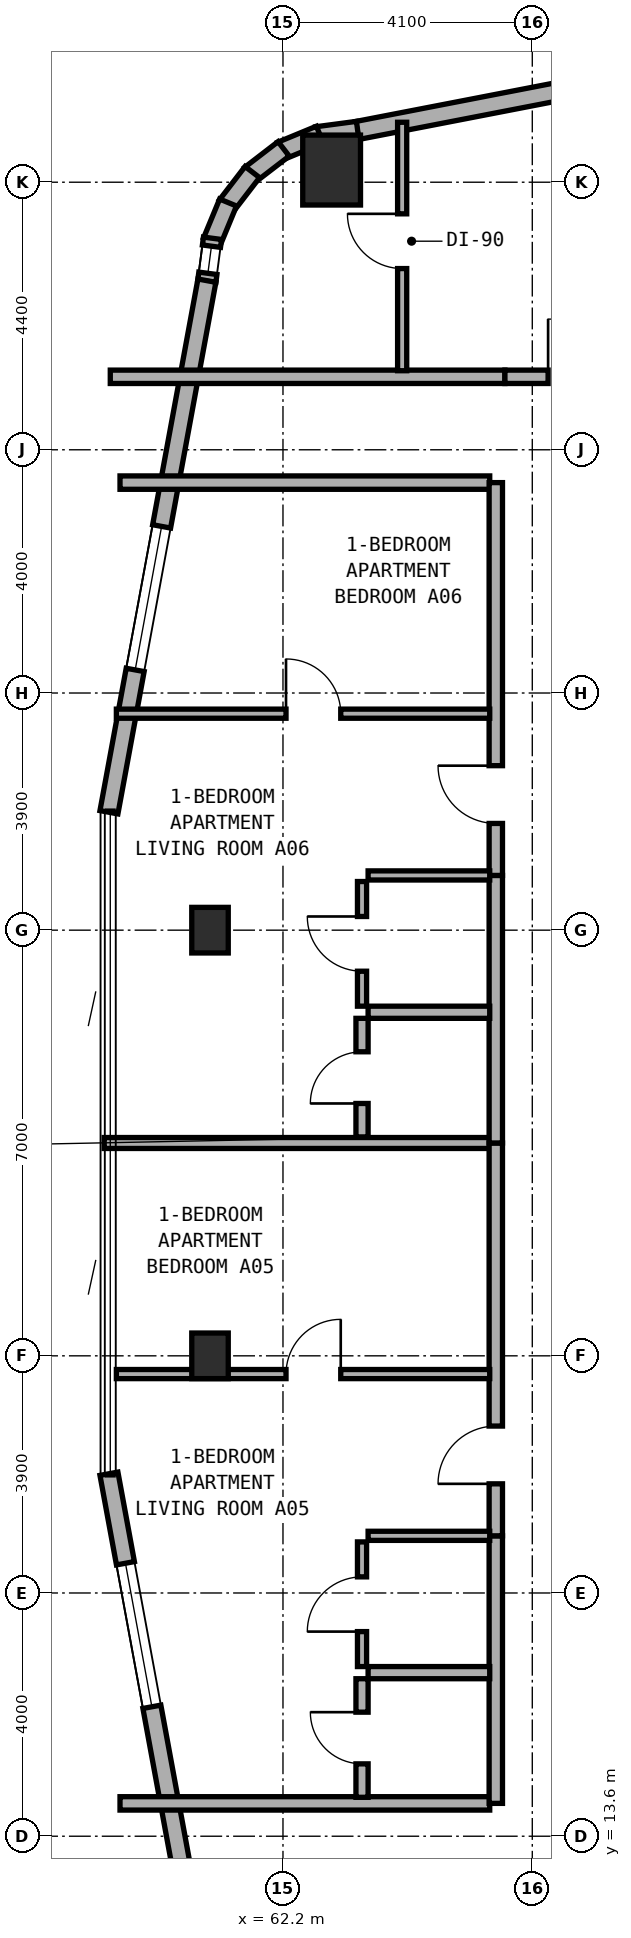
"""IFC4 building model, lengths in metres.
Left out: names, types, materials, properties, quantities, classifications, styles, units other than length and angle.
Written with IfcOpenShell. Run it as: python <this file> out.ifc"""

import sys

from ifc_helpers import new_model, si_unit, direction, frame, frame_2d, origin, origin_2d, place, context, subcontext, project, spatial, rectangle, extrude, element, fill, save


model = new_model("IFC4")
c1 = context("Model", 3, precision=1e-05, world=origin(), true_north=direction((0.0, 1.0)))
c2 = subcontext(c1, "Body", "Model", "MODEL_VIEW")
j1 = project(units=[si_unit("LENGTHUNIT", "METRE"), si_unit("PLANEANGLEUNIT", "RADIAN")], contexts=[c1])
p1 = place(None, origin())
s1 = spatial("IfcSite", under=j1, at=p1, CompositionType="ELEMENT")
p2 = place(p1, origin())
s2 = spatial("IfcBuilding", under=s1, at=p2, CompositionType="ELEMENT")
p3 = place(p2, frame((0.0, 0.0, 83.5)))
s3 = spatial("IfcBuildingStorey", under=s2, at=p3, CompositionType="ELEMENT", Elevation=83.5)
for number, where, z_axis, x_axis in (
    (1, (61.0, 21.5, 0.0), (0.0, 0.0, 1.0), (1.0, 0.0, 0.0)),
    (2, (61.0, 28.5, 0.0), (0.0, 0.0, 1.0), (1.0, 0.0, 0.0)),
):
    element("IfcColumn", number, at=place(p3, frame(where, z_axis=z_axis, x_axis=x_axis)), inside=s3, PredefinedType="COLUMN", context=c2, shape_type="SweptSolid", body=[
        extrude(rectangle(XDim=0.6, YDim=0.75, at=origin_2d()), origin(), (0.0, 0.0, 1.0), 3.5),
    ])
p4 = place(p3, frame((63.0, 41.0, 0.0), z_axis=(0.0, 0.0, 1.0), x_axis=(1.0, 0.0, 0.0)))
e3 = element("IfcColumn", 3, at=p4, inside=s3, PredefinedType="COLUMN", context=c2, shape_type="SweptSolid", body=[
    extrude(rectangle(XDim=0.95, YDim=1.15, at=origin_2d()), origin(), (0.0, 0.0, 1.0), 3.5),
])
p5 = place(p3, frame((71.743, 43.263, 0.0), z_axis=(0.0, 0.0, 1.0), x_axis=(-0.981750199588, -0.190175039396, 0.0)))
e4 = element("IfcWall", 4, at=p5, inside=s3, PredefinedType="STANDARD", context=c2, shape_type="SweptSolid", body=[
    extrude(rectangle(XDim=8.477, YDim=0.3, at=frame_2d((4.238, 0.0))), origin(), (0.0, 0.0, 1.0), 3.25),
])
p6 = place(p5, frame((2.623, 0.0, 0.8)))
e5 = element("IfcOpeningElement", 5, at=p6, cuts=e4, PredefinedType="OPENING", context=c2, shape_type="SweptSolid", body=[
    extrude(rectangle(XDim=2.4, YDim=1.6, at=frame_2d((1.2, 0.8))), frame((0.0, 0.16, 0.0), z_axis=(0.0, -1.0, 0.0), x_axis=(1.0, 0.0, 0.0)), (0.0, 0.0, 1.0), 0.32),
])
p7 = place(p3, frame((63.428, 41.652, 0.0), z_axis=(0.0, 0.0, 1.0), x_axis=(-0.991293937098, -0.131667498923, 0.0)))
e6 = element("IfcWall", 6, at=p7, inside=s3, PredefinedType="STANDARD", context=c2, shape_type="SweptSolid", body=[
    extrude(rectangle(XDim=0.677, YDim=0.3, at=frame_2d((0.338, 0.0))), origin(), (0.0, 0.0, 1.0), 3.25),
])
p8 = place(p3, frame((62.807, 41.582, 0.0), z_axis=(0.0, 0.0, 1.0), x_axis=(-0.924042561464, -0.382289608286, 0.0)))
e7 = element("IfcWall", 7, at=p8, inside=s3, PredefinedType="STANDARD", context=c2, shape_type="SweptSolid", body=[
    extrude(rectangle(XDim=0.694, YDim=0.3, at=frame_2d((0.347, 0.0))), origin(), (0.0, 0.0, 1.0), 3.25),
])
for number, where, z_axis, x_axis in (
    (8, (62.211, 41.348, 0.0), (0.0, 0.0, 1.0), (-0.793, -0.609, 0.0)),
    (9, (61.696, 40.967, 0.0), (0.0, 0.0, 1.0), (-0.61, -0.793, 0.0)),
    (10, (61.297, 40.466, 0.0), (0.0, 0.0, 1.0), (-0.382, -0.924, 0.0)),
):
    element("IfcWall", number, at=place(p3, frame(where, z_axis=z_axis, x_axis=x_axis)), inside=s3, PredefinedType="STANDARD", context=c2, shape_type="SweptSolid", body=[
        extrude(rectangle(XDim=0.694, YDim=0.3, at=frame_2d((0.347, 0.0))), origin(), (0.0, 0.0, 1.0), 3.25),
    ])
p9 = place(p3, frame((61.041, 39.878, 0.0), z_axis=(0.0, 0.0, 1.0), x_axis=(-0.130658543777, -0.991427427974, 0.0)))
e11 = element("IfcWall", 11, at=p9, inside=s3, PredefinedType="STANDARD", context=c2, shape_type="SweptSolid", body=[
    extrude(rectangle(XDim=0.712, YDim=0.3, at=frame_2d((0.356, 0.0))), origin(), (0.0, 0.0, 1.0), 3.25),
])
p10 = place(p9, frame((0.131, 0.0, 0.85)))
e12 = element("IfcOpeningElement", 12, at=p10, cuts=e11, PredefinedType="OPENING", context=c2, shape_type="SweptSolid", body=[
    extrude(rectangle(XDim=0.45, YDim=1.5, at=frame_2d((0.225, 0.75))), frame((0.0, 0.16, 0.0), z_axis=(0.0, -1.0, 0.0), x_axis=(1.0, 0.0, 0.0)), (0.0, 0.0, 1.0), 0.32),
])
p11 = place(p3, frame((60.949, 39.181, 0.0), z_axis=(0.0, 0.0, 1.0), x_axis=(-0.181241420611, -0.983438634311, 0.0)))
e13 = element("IfcWall", 13, at=p11, inside=s3, PredefinedType="STANDARD", context=c2, shape_type="SweptSolid", body=[
    extrude(rectangle(XDim=8.889, YDim=0.3, at=frame_2d((4.445, 0.0))), origin(), (0.0, 0.0, 1.0), 3.25),
])
p12 = place(p11, frame((4.109, 0.0, 0.8)))
e14 = element("IfcOpeningElement", 14, at=p12, cuts=e13, PredefinedType="OPENING", context=c2, shape_type="SweptSolid", body=[
    extrude(rectangle(XDim=2.4, YDim=1.6, at=frame_2d((1.2, 0.8))), frame((0.0, 0.16, 0.0), z_axis=(0.0, -1.0, 0.0), x_axis=(1.0, 0.0, 0.0)), (0.0, 0.0, 1.0), 0.32),
])
p13 = place(p3, frame((59.338, 19.561, 0.0), z_axis=(0.0, 0.0, 1.0), x_axis=(0.181241420611, -0.983438634311, 0.0)))
e15 = element("IfcWall", 15, at=p13, inside=s3, PredefinedType="STANDARD", context=c2, shape_type="SweptSolid", body=[
    extrude(rectangle(XDim=8.889, YDim=0.3, at=frame_2d((4.445, 0.0))), origin(), (0.0, 0.0, 1.0), 3.25),
])
p14 = place(p13, frame((1.497, 0.0, 0.8)))
e16 = element("IfcOpeningElement", 16, at=p14, cuts=e15, PredefinedType="OPENING", context=c2, shape_type="SweptSolid", body=[
    extrude(rectangle(XDim=2.4, YDim=1.6, at=frame_2d((1.2, 0.8))), frame((0.0, 0.16, 0.0), z_axis=(0.0, -1.0, 0.0), x_axis=(1.0, 0.0, 0.0)), (0.0, 0.0, 1.0), 0.32),
])
p15 = place(p3, frame((59.36, 37.6, 0.0), z_axis=(0.0, 0.0, 1.0), x_axis=(1.0, 0.0, 0.0)))
e17 = element("IfcWall", 17, at=p15, inside=s3, PredefinedType="SOLIDWALL", context=c2, shape_type="SweptSolid", body=[
    extrude(rectangle(XDim=6.49, YDim=0.22, at=frame_2d((3.245, 0.0))), origin(), (0.0, 0.0, 1.0), 2.945),
])
p16 = place(p3, frame((65.85, 37.6, 0.0), z_axis=(0.0, 0.0, 1.0), x_axis=(1.0, 0.0, 0.0)))
e18 = element("IfcWall", 18, at=p16, inside=s3, PredefinedType="SOLIDWALL", context=c2, shape_type="SweptSolid", body=[
    extrude(rectangle(XDim=2.37, YDim=0.22, at=frame_2d((1.185, 0.0))), origin(), (0.0, 0.0, 1.0), 3.22),
])
p17 = place(p16, frame((0.71, 0.0, 0.0)))
e19 = element("IfcOpeningElement", 19, at=p17, cuts=e18, PredefinedType="OPENING", context=c2, shape_type="SweptSolid", body=[
    extrude(rectangle(XDim=0.95, YDim=2.1, at=frame_2d((0.475, 1.05))), frame((0.0, 0.12, 0.0), z_axis=(0.0, -1.0, 0.0), x_axis=(1.0, 0.0, 0.0)), (0.0, 0.0, 1.0), 0.24),
])
p18 = place(p3, frame((64.16, 37.7, 0.0), z_axis=(0.0, 0.0, 1.0), x_axis=(0.0, 1.0, 0.0)))
e20 = element("IfcWall", 20, at=p18, inside=s3, PredefinedType="PARTITIONING", context=c2, shape_type="SweptSolid", body=[
    extrude(rectangle(XDim=4.086, YDim=0.15, at=frame_2d((2.043, 0.0))), origin(), (0.0, 0.0, 1.0), 2.945),
])
p19 = place(p18, frame((1.68, 0.0, 0.0)))
e21 = element("IfcOpeningElement", 21, at=p19, cuts=e20, PredefinedType="OPENING", context=c2, shape_type="SweptSolid", body=[
    extrude(rectangle(XDim=0.9, YDim=2.1, at=frame_2d((0.45, 1.05))), frame((0.0, 0.085, 0.0), z_axis=(0.0, -1.0, 0.0), x_axis=(1.0, 0.0, 0.0)), (0.0, 0.0, 1.0), 0.17),
])
for number, where, z_axis, x_axis in (
    (22, (59.52, 14.14, 0.0), (0.0, 0.0, 1.0), (1.0, 0.0, 0.0)),
    (23, (59.52, 35.86, 0.0), (0.0, 0.0, 1.0), (1.0, 0.0, 0.0)),
):
    element("IfcWall", number, at=place(p3, frame(where, z_axis=z_axis, x_axis=x_axis)), inside=s3, PredefinedType="SOLIDWALL", context=c2, shape_type="SweptSolid", body=[
        extrude(rectangle(XDim=6.08, YDim=0.22, at=frame_2d((3.04, 0.0))), origin(), (0.0, 0.0, 1.0), 2.945),
    ])
p20 = place(p3, frame((59.26, 25.0, 0.0), z_axis=(0.0, 0.0, 1.0), x_axis=(1.0, 0.0, 0.0)))
e24 = element("IfcWall", 24, at=p20, inside=s3, PredefinedType="SOLIDWALL", context=c2, shape_type="SweptSolid", body=[
    extrude(rectangle(XDim=6.44, YDim=0.18, at=frame_2d((3.22, 0.0))), origin(), (0.0, 0.0, 1.0), 2.945),
])
p21 = place(p3, frame((65.7, 14.14, 0.0), z_axis=(0.0, 0.0, 1.0), x_axis=(0.0, 1.0, 0.0)))
e25 = element("IfcWall", 25, at=p21, inside=s3, PredefinedType="SOLIDWALL", context=c2, shape_type="SweptSolid", body=[
    extrude(rectangle(XDim=4.4, YDim=0.22, at=frame_2d((2.2, 0.0))), origin(), (0.0, 0.0, 1.0), 3.22),
])
p22 = place(p3, frame((65.7, 18.54, 0.0), z_axis=(0.0, 0.0, 1.0), x_axis=(0.0, 1.0, 0.0)))
e26 = element("IfcWall", 26, at=p22, inside=s3, PredefinedType="SOLIDWALL", context=c2, shape_type="SweptSolid", body=[
    extrude(rectangle(XDim=6.46, YDim=0.22, at=frame_2d((3.23, 0.0))), origin(), (0.0, 0.0, 1.0), 2.825),
])
p23 = place(p22, frame((0.855, 0.0, 0.0)))
e27 = element("IfcOpeningElement", 27, at=p23, cuts=e26, PredefinedType="OPENING", context=c2, shape_type="SweptSolid", body=[
    extrude(rectangle(XDim=0.95, YDim=2.1, at=frame_2d((0.475, 1.05))), frame((0.0, 0.12, 0.0), z_axis=(0.0, -1.0, 0.0), x_axis=(1.0, 0.0, 0.0)), (0.0, 0.0, 1.0), 0.24),
])
p24 = place(p3, frame((59.46, 21.2, 0.0), z_axis=(0.0, 0.0, 1.0), x_axis=(1.0, 0.0, 0.0)))
e28 = element("IfcWall", 28, at=p24, inside=s3, PredefinedType="PARTITIONING", context=c2, shape_type="SweptSolid", body=[
    extrude(rectangle(XDim=6.14, YDim=0.15, at=frame_2d((3.07, 0.0))), origin(), (0.0, 0.0, 1.0), 2.945),
])
p25 = place(p24, frame((2.79, 0.0, 0.0)))
e29 = element("IfcOpeningElement", 29, at=p25, cuts=e28, PredefinedType="OPENING", context=c2, shape_type="SweptSolid", body=[
    extrude(rectangle(XDim=0.9, YDim=2.1, at=frame_2d((0.45, 1.05))), frame((0.0, 0.085, 0.0), z_axis=(0.0, -1.0, 0.0), x_axis=(1.0, 0.0, 0.0)), (0.0, 0.0, 1.0), 0.17),
])
p26 = place(p3, frame((63.6, 16.29, 0.0), z_axis=(0.0, 0.0, 1.0), x_axis=(1.0, 0.0, 0.0)))
e30 = element("IfcWall", 30, at=p26, inside=s3, PredefinedType="PLUMBINGWALL", context=c2, shape_type="SweptSolid", body=[
    extrude(rectangle(XDim=2.0, YDim=0.2, at=frame_2d((1.0, 0.0))), origin(), (0.0, 0.0, 1.0), 3.22),
])
p27 = place(p3, frame((63.6, 18.54, 0.0), z_axis=(0.0, 0.0, 1.0), x_axis=(1.0, 0.0, 0.0)))
e31 = element("IfcWall", 31, at=p27, inside=s3, PredefinedType="PARTITIONING", context=c2, shape_type="SweptSolid", body=[
    extrude(rectangle(XDim=2.0, YDim=0.15, at=frame_2d((1.0, 0.0))), origin(), (0.0, 0.0, 1.0), 3.22),
])
p28 = place(p3, frame((63.5, 14.24, 0.0), z_axis=(0.0, 0.0, 1.0), x_axis=(0.0, 1.0, 0.0)))
e32 = element("IfcWall", 32, at=p28, inside=s3, PredefinedType="PLUMBINGWALL", context=c2, shape_type="SweptSolid", body=[
    extrude(rectangle(XDim=1.95, YDim=0.2, at=frame_2d((0.975, 0.0))), origin(), (0.0, 0.0, 1.0), 3.22),
])
p29 = place(p28, frame((0.55, 0.0, 0.0)))
e33 = element("IfcOpeningElement", 33, at=p29, cuts=e32, PredefinedType="OPENING", context=c2, shape_type="SweptSolid", body=[
    extrude(rectangle(XDim=0.85, YDim=2.1, at=frame_2d((0.425, 1.05))), frame((0.0, 0.11, 0.0), z_axis=(0.0, -1.0, 0.0), x_axis=(1.0, 0.0, 0.0)), (0.0, 0.0, 1.0), 0.22),
])
p30 = place(p3, frame((63.5, 16.39, 0.0), z_axis=(0.0, 0.0, 1.0), x_axis=(0.0, 1.0, 0.0)))
e34 = element("IfcWall", 34, at=p30, inside=s3, PredefinedType="PARTITIONING", context=c2, shape_type="SweptSolid", body=[
    extrude(rectangle(XDim=2.05, YDim=0.15, at=frame_2d((1.025, 0.0))), origin(), (0.0, 0.0, 1.0), 3.22),
])
p31 = place(p30, frame((0.575, 0.0, 0.0)))
e35 = element("IfcOpeningElement", 35, at=p31, cuts=e34, PredefinedType="OPENING", context=c2, shape_type="SweptSolid", body=[
    extrude(rectangle(XDim=0.9, YDim=2.1, at=frame_2d((0.45, 1.05))), frame((0.0, 0.085, 0.0), z_axis=(0.0, -1.0, 0.0), x_axis=(1.0, 0.0, 0.0)), (0.0, 0.0, 1.0), 0.17),
])
p32 = place(p3, frame((65.7, 25.0, 0.0), z_axis=(0.0, 0.0, 1.0), x_axis=(0.0, 1.0, 0.0)))
e36 = element("IfcWall", 36, at=p32, inside=s3, PredefinedType="SOLIDWALL", context=c2, shape_type="SweptSolid", body=[
    extrude(rectangle(XDim=4.4, YDim=0.22, at=frame_2d((2.2, 0.0))), origin(), (0.0, 0.0, 1.0), 2.825),
])
p33 = place(p3, frame((65.7, 29.4, 0.0), z_axis=(0.0, 0.0, 1.0), x_axis=(0.0, 1.0, 0.0)))
e37 = element("IfcWall", 37, at=p33, inside=s3, PredefinedType="SOLIDWALL", context=c2, shape_type="SweptSolid", body=[
    extrude(rectangle(XDim=6.46, YDim=0.22, at=frame_2d((3.23, 0.0))), origin(), (0.0, 0.0, 1.0), 3.22),
])
p34 = place(p33, frame((0.855, 0.0, 0.0)))
e38 = element("IfcOpeningElement", 38, at=p34, cuts=e37, PredefinedType="OPENING", context=c2, shape_type="SweptSolid", body=[
    extrude(rectangle(XDim=0.95, YDim=2.1, at=frame_2d((0.475, 1.05))), frame((0.0, 0.12, 0.0), z_axis=(0.0, -1.0, 0.0), x_axis=(1.0, 0.0, 0.0)), (0.0, 0.0, 1.0), 0.24),
])
p35 = place(p3, frame((59.46, 32.06, 0.0), z_axis=(0.0, 0.0, 1.0), x_axis=(1.0, 0.0, 0.0)))
e39 = element("IfcWall", 39, at=p35, inside=s3, PredefinedType="PARTITIONING", context=c2, shape_type="SweptSolid", body=[
    extrude(rectangle(XDim=6.14, YDim=0.15, at=frame_2d((3.07, 0.0))), origin(), (0.0, 0.0, 1.0), 2.945),
])
p36 = place(p35, frame((2.79, 0.0, 0.0)))
e40 = element("IfcOpeningElement", 40, at=p36, cuts=e39, PredefinedType="OPENING", context=c2, shape_type="SweptSolid", body=[
    extrude(rectangle(XDim=0.9, YDim=2.1, at=frame_2d((0.45, 1.05))), frame((0.0, 0.085, 0.0), z_axis=(0.0, -1.0, 0.0), x_axis=(1.0, 0.0, 0.0)), (0.0, 0.0, 1.0), 0.17),
])
p37 = place(p3, frame((63.6, 27.15, 0.0), z_axis=(0.0, 0.0, 1.0), x_axis=(1.0, 0.0, 0.0)))
e41 = element("IfcWall", 41, at=p37, inside=s3, PredefinedType="PLUMBINGWALL", context=c2, shape_type="SweptSolid", body=[
    extrude(rectangle(XDim=2.0, YDim=0.2, at=frame_2d((1.0, 0.0))), origin(), (0.0, 0.0, 1.0), 3.22),
])
p38 = place(p3, frame((63.6, 29.4, 0.0), z_axis=(0.0, 0.0, 1.0), x_axis=(1.0, 0.0, 0.0)))
e42 = element("IfcWall", 42, at=p38, inside=s3, PredefinedType="PARTITIONING", context=c2, shape_type="SweptSolid", body=[
    extrude(rectangle(XDim=2.0, YDim=0.15, at=frame_2d((1.0, 0.0))), origin(), (0.0, 0.0, 1.0), 3.22),
])
p39 = place(p3, frame((63.5, 25.1, 0.0), z_axis=(0.0, 0.0, 1.0), x_axis=(0.0, 1.0, 0.0)))
e43 = element("IfcWall", 43, at=p39, inside=s3, PredefinedType="PLUMBINGWALL", context=c2, shape_type="SweptSolid", body=[
    extrude(rectangle(XDim=1.95, YDim=0.2, at=frame_2d((0.975, 0.0))), origin(), (0.0, 0.0, 1.0), 3.22),
])
p40 = place(p39, frame((0.55, 0.0, 0.0)))
e44 = element("IfcOpeningElement", 44, at=p40, cuts=e43, PredefinedType="OPENING", context=c2, shape_type="SweptSolid", body=[
    extrude(rectangle(XDim=0.85, YDim=2.1, at=frame_2d((0.425, 1.05))), frame((0.0, 0.11, 0.0), z_axis=(0.0, -1.0, 0.0), x_axis=(1.0, 0.0, 0.0)), (0.0, 0.0, 1.0), 0.22),
])
p41 = place(p3, frame((63.5, 27.25, 0.0), z_axis=(0.0, 0.0, 1.0), x_axis=(0.0, 1.0, 0.0)))
e45 = element("IfcWall", 45, at=p41, inside=s3, PredefinedType="PARTITIONING", context=c2, shape_type="SweptSolid", body=[
    extrude(rectangle(XDim=2.05, YDim=0.15, at=frame_2d((1.025, 0.0))), origin(), (0.0, 0.0, 1.0), 2.825),
])
p42 = place(p41, frame((0.575, 0.0, 0.0)))
e46 = element("IfcOpeningElement", 46, at=p42, cuts=e45, PredefinedType="OPENING", context=c2, shape_type="SweptSolid", body=[
    extrude(rectangle(XDim=0.9, YDim=2.1, at=frame_2d((0.45, 1.05))), frame((0.0, 0.085, 0.0), z_axis=(0.0, -1.0, 0.0), x_axis=(1.0, 0.0, 0.0)), (0.0, 0.0, 1.0), 0.17),
])
p43 = place(p12, origin())
e47 = element("IfcWindow", 47, at=p43, inside=s3, PartitioningType="SINGLE_PANEL", PredefinedType="WINDOW", context=c2, shape_type="SweptSolid", body=[
    extrude(rectangle(XDim=2.4, YDim=1.6, at=frame_2d((1.2, 0.8))), frame((0.0, 0.03, 0.0), z_axis=(0.0, -1.0, 0.0), x_axis=(1.0, 0.0, 0.0)), (0.0, 0.0, 1.0), 0.06),
])
fill(e14, e47)
p44 = place(p14, origin())
e48 = element("IfcWindow", 48, at=p44, inside=s3, PartitioningType="SINGLE_PANEL", PredefinedType="WINDOW", context=c2, shape_type="SweptSolid", body=[
    extrude(rectangle(XDim=2.4, YDim=1.6, at=frame_2d((1.2, 0.8))), frame((0.0, 0.03, 0.0), z_axis=(0.0, -1.0, 0.0), x_axis=(1.0, 0.0, 0.0)), (0.0, 0.0, 1.0), 0.06),
])
fill(e16, e48)
p45 = place(p10, origin())
e49 = element("IfcWindow", 49, at=p45, inside=s3, PartitioningType="SINGLE_PANEL", PredefinedType="WINDOW", context=c2, shape_type="SweptSolid", body=[
    extrude(rectangle(XDim=0.45, YDim=1.5, at=frame_2d((0.225, 0.75))), frame((0.0, 0.03, 0.0), z_axis=(0.0, -1.0, 0.0), x_axis=(1.0, 0.0, 0.0)), (0.0, 0.0, 1.0), 0.06),
])
fill(e12, e49)
p46 = place(p17, origin())
e50 = element("IfcDoor", 50, at=p46, inside=s3, OperationType="SINGLE_SWING_LEFT", PredefinedType="DOOR", context=c2, shape_type="SweptSolid", body=[
    extrude(rectangle(XDim=0.95, YDim=2.1, at=frame_2d((0.475, 1.05))), frame((0.0, 0.025, 0.0), z_axis=(0.0, -1.0, 0.0), x_axis=(1.0, 0.0, 0.0)), (0.0, 0.0, 1.0), 0.05),
])
fill(e19, e50)
p47 = place(p19, origin())
e51 = element("IfcDoor", 51, at=p47, inside=s3, OperationType="SINGLE_SWING_RIGHT", PredefinedType="DOOR", context=c2, shape_type="SweptSolid", body=[
    extrude(rectangle(XDim=0.9, YDim=2.1, at=frame_2d((0.45, 1.05))), frame((0.0, 0.025, 0.0), z_axis=(0.0, -1.0, 0.0), x_axis=(1.0, 0.0, 0.0)), (0.0, 0.0, 1.0), 0.05),
])
fill(e21, e51)
p48 = place(p23, origin())
e52 = element("IfcDoor", 52, at=p48, inside=s3, OperationType="SINGLE_SWING_LEFT", PredefinedType="DOOR", context=c2, shape_type="SweptSolid", body=[
    extrude(rectangle(XDim=0.95, YDim=2.1, at=frame_2d((0.475, 1.05))), frame((0.0, 0.025, 0.0), z_axis=(0.0, -1.0, 0.0), x_axis=(1.0, 0.0, 0.0)), (0.0, 0.0, 1.0), 0.05),
])
fill(e27, e52)
p49 = place(p25, origin())
e53 = element("IfcDoor", 53, at=p49, inside=s3, OperationType="SINGLE_SWING_RIGHT", PredefinedType="DOOR", context=c2, shape_type="SweptSolid", body=[
    extrude(rectangle(XDim=0.9, YDim=2.1, at=frame_2d((0.45, 1.05))), frame((0.0, 0.025, 0.0), z_axis=(0.0, -1.0, 0.0), x_axis=(1.0, 0.0, 0.0)), (0.0, 0.0, 1.0), 0.05),
])
fill(e29, e53)
p50 = place(p29, origin())
e54 = element("IfcDoor", 54, at=p50, inside=s3, OperationType="SINGLE_SWING_RIGHT", PredefinedType="DOOR", context=c2, shape_type="SweptSolid", body=[
    extrude(rectangle(XDim=0.85, YDim=2.1, at=frame_2d((0.425, 1.05))), frame((0.0, 0.025, 0.0), z_axis=(0.0, -1.0, 0.0), x_axis=(1.0, 0.0, 0.0)), (0.0, 0.0, 1.0), 0.05),
])
fill(e33, e54)
p51 = place(p31, origin())
e55 = element("IfcDoor", 55, at=p51, inside=s3, OperationType="SINGLE_SWING_LEFT", PredefinedType="DOOR", context=c2, shape_type="SweptSolid", body=[
    extrude(rectangle(XDim=0.9, YDim=2.1, at=frame_2d((0.45, 1.05))), frame((0.0, 0.025, 0.0), z_axis=(0.0, -1.0, 0.0), x_axis=(1.0, 0.0, 0.0)), (0.0, 0.0, 1.0), 0.05),
])
fill(e35, e55)
p52 = place(p34, origin())
e56 = element("IfcDoor", 56, at=p52, inside=s3, OperationType="SINGLE_SWING_RIGHT", PredefinedType="DOOR", context=c2, shape_type="SweptSolid", body=[
    extrude(rectangle(XDim=0.95, YDim=2.1, at=frame_2d((0.475, 1.05))), frame((0.0, 0.025, 0.0), z_axis=(0.0, -1.0, 0.0), x_axis=(1.0, 0.0, 0.0)), (0.0, 0.0, 1.0), 0.05),
])
fill(e38, e56)
p53 = place(p36, origin())
e57 = element("IfcDoor", 57, at=p53, inside=s3, OperationType="SINGLE_SWING_LEFT", PredefinedType="DOOR", context=c2, shape_type="SweptSolid", body=[
    extrude(rectangle(XDim=0.9, YDim=2.1, at=frame_2d((0.45, 1.05))), frame((0.0, 0.025, 0.0), z_axis=(0.0, -1.0, 0.0), x_axis=(1.0, 0.0, 0.0)), (0.0, 0.0, 1.0), 0.05),
])
fill(e40, e57)
p54 = place(p40, origin())
e58 = element("IfcDoor", 58, at=p54, inside=s3, OperationType="SINGLE_SWING_LEFT", PredefinedType="DOOR", context=c2, shape_type="SweptSolid", body=[
    extrude(rectangle(XDim=0.85, YDim=2.1, at=frame_2d((0.425, 1.05))), frame((0.0, 0.025, 0.0), z_axis=(0.0, -1.0, 0.0), x_axis=(1.0, 0.0, 0.0)), (0.0, 0.0, 1.0), 0.05),
])
fill(e44, e58)
p55 = place(p42, origin())
e59 = element("IfcDoor", 59, at=p55, inside=s3, OperationType="SINGLE_SWING_RIGHT", PredefinedType="DOOR", context=c2, shape_type="SweptSolid", body=[
    extrude(rectangle(XDim=0.9, YDim=2.1, at=frame_2d((0.45, 1.05))), frame((0.0, 0.025, 0.0), z_axis=(0.0, -1.0, 0.0), x_axis=(1.0, 0.0, 0.0)), (0.0, 0.0, 1.0), 0.05),
])
fill(e46, e59)
save(model, sys.argv[1])
